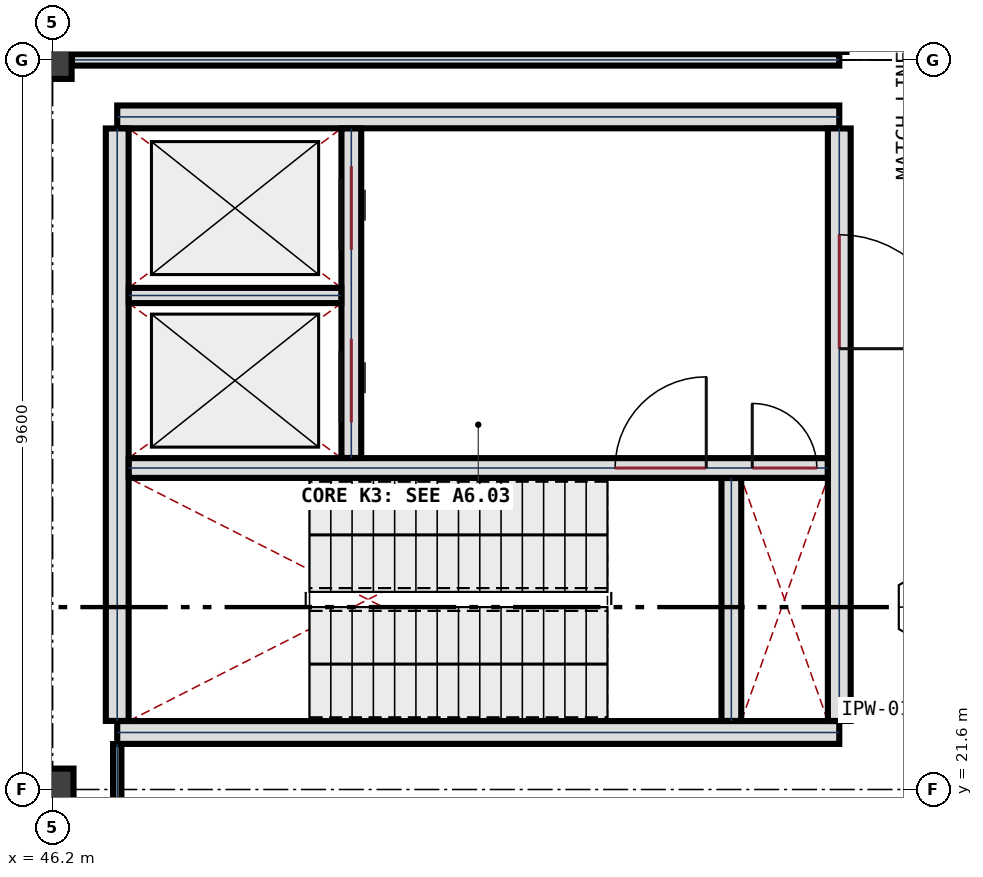
"""IFC4 building model, lengths in metres.
Left out: names, types, materials, properties, quantities, classifications, styles, units other than length and angle.
Written with IfcOpenShell. Run it as: python <this file> out.ifc"""

import sys

from ifc_helpers import new_model, si_unit, direction, frame, frame_2d, origin, origin_2d, place, context, subcontext, project, spatial, rectangle, extrude, element, fill, save


model = new_model("IFC4")
c1 = context("Model", 3, precision=1e-05, world=origin(), true_north=direction((0.0, 1.0)))
c2 = subcontext(c1, "Body", "Model", "MODEL_VIEW")
j1 = project(units=[si_unit("LENGTHUNIT", "METRE"), si_unit("PLANEANGLEUNIT", "RADIAN")], contexts=[c1])
p1 = place(None, origin())
s1 = spatial("IfcSite", under=j1, at=p1, CompositionType="ELEMENT")
p2 = place(p1, origin())
s2 = spatial("IfcBuilding", under=s1, at=p2, CompositionType="ELEMENT")
p3 = place(p2, origin())
s3 = spatial("IfcBuildingStorey", under=s2, at=p3, CompositionType="ELEMENT", Elevation=0.0)
p4 = place(p3, frame((46.2, 21.6, 0.0), z_axis=(0.0, 0.0, 1.0), x_axis=(1.0, 0.0, 0.0)))
e1 = element("IfcColumn", 1, at=p4, inside=s3, PredefinedType="COLUMN", context=c2, shape_type="SweptSolid", body=[
    extrude(rectangle(XDim=0.55, YDim=0.55, at=origin_2d()), origin(), (0.0, 0.0, 1.0), 5.4),
])
p5 = place(p3, frame((46.2, 31.2, 0.0), z_axis=(0.0, 0.0, 1.0), x_axis=(1.0, 0.0, 0.0)))
e2 = element("IfcColumn", 2, at=p5, inside=s3, PredefinedType="COLUMN", context=c2, shape_type="SweptSolid", body=[
    extrude(rectangle(XDim=0.5, YDim=0.5, at=origin_2d()), origin(), (0.0, 0.0, 1.0), 5.4),
])
for number, where, z_axis, x_axis in (
    (3, (56.55, 22.35, 0.0), (0.0, 0.0, 1.0), (-1.0, 0.0, 0.0)),
    (4, (47.05, 30.45, 0.0), (0.0, 0.0, 1.0), (1.0, 0.0, 0.0)),
):
    element("IfcWall", number, at=place(p3, frame(where, z_axis=z_axis, x_axis=x_axis)), inside=s3, PredefinedType="SHEAR", context=c2, shape_type="SweptSolid", body=[
        extrude(rectangle(XDim=9.5, YDim=0.3, at=frame_2d((4.75, 0.0))), origin(), (0.0, 0.0, 1.0), 5.4),
    ])
p6 = place(p3, frame((47.05, 22.502, 0.0), z_axis=(0.0, 0.0, 1.0), x_axis=(0.0, 1.0, 0.0)))
e5 = element("IfcWall", 5, at=p6, inside=s3, PredefinedType="SHEAR", context=c2, shape_type="SweptSolid", body=[
    extrude(rectangle(XDim=7.796, YDim=0.3, at=frame_2d((3.898, 0.0))), origin(), (0.0, 0.0, 1.0), 5.4),
])
p7 = place(p3, frame((56.55, 30.298, 0.0), z_axis=(0.0, 0.0, 1.0), x_axis=(0.0, -1.0, 0.0)))
e6 = element("IfcWall", 6, at=p7, inside=s3, PredefinedType="SHEAR", context=c2, shape_type="SweptSolid", body=[
    extrude(rectangle(XDim=7.796, YDim=0.3, at=frame_2d((3.898, 0.0))), origin(), (0.0, 0.0, 1.0), 5.4),
])
p8 = place(p7, frame((1.398, 0.0, 0.0)))
e7 = element("IfcOpeningElement", 7, at=p8, cuts=e6, PredefinedType="OPENING", context=c2, shape_type="SweptSolid", body=[
    extrude(rectangle(XDim=1.5, YDim=2.25, at=frame_2d((0.75, 1.125))), frame((0.0, 0.16, 0.0), z_axis=(0.0, -1.0, 0.0), x_axis=(1.0, 0.0, 0.0)), (0.0, 0.0, 1.0), 0.32),
])
p9 = place(p3, frame((47.202, 25.83, 0.0), z_axis=(0.0, 0.0, 1.0), x_axis=(1.0, 0.0, 0.0)))
e8 = element("IfcWall", 8, at=p9, inside=s3, PredefinedType="SHEAR", context=c2, shape_type="SweptSolid", body=[
    extrude(rectangle(XDim=9.196, YDim=0.26, at=frame_2d((4.598, 0.0))), origin(), (0.0, 0.0, 1.0), 5.4),
])
p10 = place(p9, frame((6.398, 0.0, 0.0)))
e9 = element("IfcOpeningElement", 9, at=p10, cuts=e8, PredefinedType="OPENING", context=c2, shape_type="SweptSolid", body=[
    extrude(rectangle(XDim=1.2, YDim=2.2, at=frame_2d((0.6, 1.1))), frame((0.0, 0.14, 0.0), z_axis=(0.0, -1.0, 0.0), x_axis=(1.0, 0.0, 0.0)), (0.0, 0.0, 1.0), 0.28),
])
p11 = place(p9, frame((8.203, 0.0, 0.0)))
e10 = element("IfcOpeningElement", 10, at=p11, cuts=e8, PredefinedType="OPENING", context=c2, shape_type="SweptSolid", body=[
    extrude(rectangle(XDim=0.85, YDim=2.05, at=frame_2d((0.425, 1.025))), frame((0.0, 0.14, 0.0), z_axis=(0.0, -1.0, 0.0), x_axis=(1.0, 0.0, 0.0)), (0.0, 0.0, 1.0), 0.28),
])
p12 = place(p3, frame((55.13, 22.502, 0.0), z_axis=(0.0, 0.0, 1.0), x_axis=(0.0, 1.0, 0.0)))
e11 = element("IfcWall", 11, at=p12, inside=s3, PredefinedType="SHEAR", context=c2, shape_type="SweptSolid", body=[
    extrude(rectangle(XDim=3.196, YDim=0.26, at=frame_2d((1.598, 0.0))), origin(), (0.0, 0.0, 1.0), 5.4),
])
p13 = place(p3, frame((50.13, 25.962, 0.0), z_axis=(0.0, 0.0, 1.0), x_axis=(0.0, 1.0, 0.0)))
e12 = element("IfcWall", 12, at=p13, inside=s3, PredefinedType="SHEAR", context=c2, shape_type="SweptSolid", body=[
    extrude(rectangle(XDim=4.336, YDim=0.26, at=frame_2d((2.168, 0.0))), origin(), (0.0, 0.0, 1.0), 5.4),
])
p14 = place(p13, frame((0.468, 0.0, 0.0)))
e13 = element("IfcOpeningElement", 13, at=p14, cuts=e12, PredefinedType="OPENING", context=c2, shape_type="SweptSolid", body=[
    extrude(rectangle(XDim=1.1, YDim=2.15, at=frame_2d((0.55, 1.075))), frame((0.0, 0.14, 0.0), z_axis=(0.0, -1.0, 0.0), x_axis=(1.0, 0.0, 0.0)), (0.0, 0.0, 1.0), 0.28),
])
p15 = place(p13, frame((2.738, 0.0, 0.0)))
e14 = element("IfcOpeningElement", 14, at=p15, cuts=e12, PredefinedType="OPENING", context=c2, shape_type="SweptSolid", body=[
    extrude(rectangle(XDim=1.1, YDim=2.15, at=frame_2d((0.55, 1.075))), frame((0.0, 0.14, 0.0), z_axis=(0.0, -1.0, 0.0), x_axis=(1.0, 0.0, 0.0)), (0.0, 0.0, 1.0), 0.28),
])
p16 = place(p3, frame((47.202, 28.1, 0.0), z_axis=(0.0, 0.0, 1.0), x_axis=(1.0, 0.0, 0.0)))
e15 = element("IfcWall", 15, at=p16, inside=s3, PredefinedType="PLUMBINGWALL", context=c2, shape_type="SweptSolid", body=[
    extrude(rectangle(XDim=2.796, YDim=0.2, at=frame_2d((1.398, 0.0))), origin(), (0.0, 0.0, 1.0), 5.08),
])
p17 = place(p3, frame((46.453, 31.2, 0.0), z_axis=(0.0, 0.0, 1.0), x_axis=(1.0, 0.0, 0.0)))
e16 = element("IfcWall", 16, at=p17, inside=s3, PredefinedType="PARTITIONING", context=c2, shape_type="SweptSolid", body=[
    extrude(rectangle(XDim=10.097, YDim=0.15, at=frame_2d((5.049, 0.0))), origin(), (0.0, 0.0, 1.0), 4.22),
])
p18 = place(p3, frame((47.05, 20.905, 0.0), z_axis=(0.0, 0.0, 1.0), x_axis=(0.0, 1.0, 0.0)))
e17 = element("IfcWall", 17, at=p18, inside=s3, PredefinedType="PARTITIONING", context=c2, shape_type="SweptSolid", body=[
    extrude(rectangle(XDim=1.292, YDim=0.11, at=frame_2d((0.646, 0.0))), origin(), (0.0, 0.0, 1.0), 4.22),
])
p19 = place(p8, origin())
e18 = element("IfcDoor", 18, at=p19, inside=s3, OperationType="SINGLE_SWING_RIGHT", PredefinedType="DOOR", context=c2, shape_type="SweptSolid", body=[
    extrude(rectangle(XDim=1.5, YDim=2.25, at=frame_2d((0.75, 1.125))), frame((0.0, 0.032, 0.0), z_axis=(0.0, -1.0, 0.0), x_axis=(1.0, 0.0, 0.0)), (0.0, 0.0, 1.0), 0.065),
])
fill(e7, e18)
p20 = place(p10, origin())
e19 = element("IfcDoor", 19, at=p20, inside=s3, OperationType="SINGLE_SWING_RIGHT", PredefinedType="DOOR", context=c2, shape_type="SweptSolid", body=[
    extrude(rectangle(XDim=1.2, YDim=2.2, at=frame_2d((0.6, 1.1))), frame((0.0, 0.032, 0.0), z_axis=(0.0, -1.0, 0.0), x_axis=(1.0, 0.0, 0.0)), (0.0, 0.0, 1.0), 0.065),
])
fill(e9, e19)
p21 = place(p11, origin())
e20 = element("IfcDoor", 20, at=p21, inside=s3, OperationType="SINGLE_SWING_LEFT", PredefinedType="DOOR", context=c2, shape_type="SweptSolid", body=[
    extrude(rectangle(XDim=0.85, YDim=2.05, at=frame_2d((0.425, 1.025))), frame((0.0, 0.032, 0.0), z_axis=(0.0, -1.0, 0.0), x_axis=(1.0, 0.0, 0.0)), (0.0, 0.0, 1.0), 0.065),
])
fill(e10, e20)
p22 = place(p14, origin())
e21 = element("IfcDoor", 21, at=p22, inside=s3, OperationType="SLIDING_TO_LEFT", PredefinedType="DOOR", context=c2, shape_type="SweptSolid", body=[
    extrude(rectangle(XDim=1.1, YDim=2.15, at=frame_2d((0.55, 1.075))), frame((0.0, 0.032, 0.0), z_axis=(0.0, -1.0, 0.0), x_axis=(1.0, 0.0, 0.0)), (0.0, 0.0, 1.0), 0.065),
])
fill(e13, e21)
p23 = place(p15, origin())
e22 = element("IfcDoor", 22, at=p23, inside=s3, OperationType="SLIDING_TO_LEFT", PredefinedType="DOOR", context=c2, shape_type="SweptSolid", body=[
    extrude(rectangle(XDim=1.1, YDim=2.15, at=frame_2d((0.55, 1.075))), frame((0.0, 0.032, 0.0), z_axis=(0.0, -1.0, 0.0), x_axis=(1.0, 0.0, 0.0)), (0.0, 0.0, 1.0), 0.065),
])
fill(e14, e22)
save(model, sys.argv[1])
